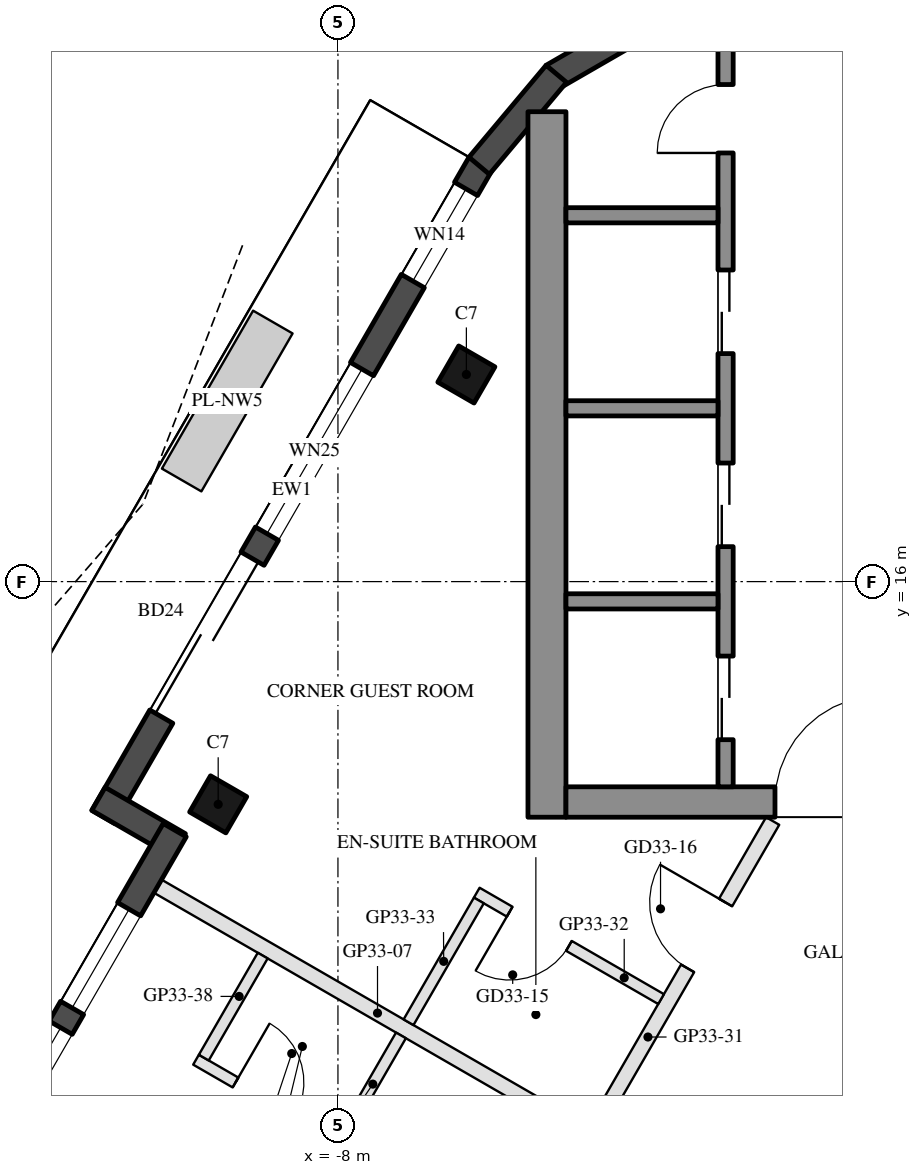
"""IFC4 building model, lengths in metres.
Left out: names, types, materials, properties, quantities, classifications, styles, units other than length and angle.
Written with IfcOpenShell. Run it as: python <this file> out.ifc"""

import sys

from ifc_helpers import new_model, si_unit, direction, frame, frame_2d, origin, origin_2d, place, context, subcontext, project, spatial, rectangle, hollow_rectangle, extrude, boolean, halfspace, element, fill, save


model = new_model("IFC4")
c1 = context("Model", 3, precision=1e-05, world=origin(), true_north=direction((0.0, 1.0)))
c2 = subcontext(c1, "Body", "Model", "MODEL_VIEW")
j1 = project(units=[si_unit("LENGTHUNIT", "METRE"), si_unit("PLANEANGLEUNIT", "RADIAN")], contexts=[c1])
p1 = place(None, origin())
s1 = spatial("IfcSite", under=j1, at=p1, CompositionType="ELEMENT")
p2 = place(p1, origin())
s2 = spatial("IfcBuilding", under=s1, at=p2, CompositionType="ELEMENT")
p3 = place(p2, frame((0.0, 0.0, 317.0)))
s3 = spatial("IfcBuildingStorey", under=s2, at=p3, CompositionType="ELEMENT", Elevation=317.0)
p4 = place(p3, frame((-6.31, 18.725, 0.0), z_axis=(0.0, 0.0, 1.0), x_axis=(0.5, 0.866025403784, 0.0)))
e1 = element("IfcColumn", 1, at=p4, inside=s3, PredefinedType="COLUMN", context=c2, shape_type="SweptSolid", body=[
    boolean("DIFFERENCE", extrude(hollow_rectangle(XDim=0.55, YDim=0.55, WallThickness=0.025, at=origin_2d()), origin(), (0.0, 0.0, 1.0), 3.7), halfspace(frame((0.0, 0.0, 3.66), z_axis=(0.0, 0.0, 1.0), x_axis=(1.0, 0.0, 0.0)), False)),
])
p5 = place(p3, frame((-9.576, 13.07, 0.0), z_axis=(0.0, 0.0, 1.0), x_axis=(0.5, 0.866025403784, 0.0)))
e2 = element("IfcColumn", 2, at=p5, inside=s3, PredefinedType="COLUMN", context=c2, shape_type="SweptSolid", body=[
    boolean("DIFFERENCE", extrude(hollow_rectangle(XDim=0.55, YDim=0.55, WallThickness=0.025, at=origin_2d()), origin(), (0.0, 0.0, 1.0), 3.7), halfspace(frame((0.0, 0.0, 3.666), z_axis=(0.0, 0.0, 1.0), x_axis=(1.0, 0.0, 0.0)), False)),
])
p6 = place(p3, frame((-6.125, 21.497, 0.0), z_axis=(0.0, 0.0, 1.0), x_axis=(-0.500002137087, -0.866024169933, 0.0)))
e3 = element("IfcWall", 3, at=p6, inside=s3, PredefinedType="SOLIDWALL", context=c2, shape_type="SweptSolid", body=[
    extrude(rectangle(XDim=9.924, YDim=0.35, at=frame_2d((4.962, 0.0))), origin(), (0.0, 0.0, 1.0), 3.55),
])
p7 = place(p6, frame((0.381, 0.0, 0.3)))
e4 = element("IfcOpeningElement", 4, at=p7, cuts=e3, PredefinedType="OPENING", context=c2, shape_type="SweptSolid", body=[
    extrude(rectangle(XDim=1.4, YDim=2.65, at=frame_2d((0.7, 1.325))), frame((0.0, 0.185, 0.0), z_axis=(0.0, -1.0, 0.0), x_axis=(1.0, 0.0, 0.0)), (0.0, 0.0, 1.0), 0.37),
])
p8 = place(p6, frame((5.999, 0.0, 0.0)))
e5 = element("IfcOpeningElement", 5, at=p8, cuts=e3, PredefinedType="OPENING", context=c2, shape_type="SweptSolid", body=[
    extrude(rectangle(XDim=2.4, YDim=2.4, at=frame_2d((1.2, 1.2))), frame((0.0, 0.185, 0.0), z_axis=(0.0, -1.0, 0.0), x_axis=(1.0, 0.0, 0.0)), (0.0, 0.0, 1.0), 0.37),
])
p9 = place(p6, frame((3.118, 0.0, 0.3)))
e6 = element("IfcOpeningElement", 6, at=p9, cuts=e3, PredefinedType="OPENING", context=c2, shape_type="SweptSolid", body=[
    extrude(rectangle(XDim=2.5, YDim=2.65, at=frame_2d((1.25, 1.325))), frame((0.0, 0.185, 0.0), z_axis=(0.0, -1.0, 0.0), x_axis=(1.0, 0.0, 0.0)), (0.0, 0.0, 1.0), 0.37),
])
p10 = place(p3, frame((-11.151, 13.142, 0.0), z_axis=(0.0, 0.0, 1.0), x_axis=(0.866005645448, -0.500034220881, 0.0)))
e7 = element("IfcWall", 7, at=p10, inside=s3, PredefinedType="SOLIDWALL", context=c2, shape_type="SweptSolid", body=[
    extrude(rectangle(XDim=1.22, YDim=0.35, at=frame_2d((0.61, 0.0))), origin(), (0.0, 0.0, 1.0), 3.55),
])
p11 = place(p3, frame((-10.147, 12.73, 0.0), z_axis=(0.0, 0.0, 1.0), x_axis=(-0.499996591357, -0.866027371756, 0.0)))
e8 = element("IfcWall", 8, at=p11, inside=s3, PredefinedType="SOLIDWALL", context=c2, shape_type="SweptSolid", body=[
    extrude(rectangle(XDim=5.371, YDim=0.35, at=frame_2d((2.685, 0.0))), origin(), (0.0, 0.0, 1.0), 3.55),
])
p12 = place(p11, frame((1.201, 0.0, 0.3)))
e9 = element("IfcOpeningElement", 9, at=p12, cuts=e8, PredefinedType="OPENING", context=c2, shape_type="SweptSolid", body=[
    extrude(rectangle(XDim=1.5, YDim=2.65, at=frame_2d((0.75, 1.325))), frame((0.0, 0.185, 0.0), z_axis=(0.0, -1.0, 0.0), x_axis=(1.0, 0.0, 0.0)), (0.0, 0.0, 1.0), 0.37),
])
p13 = place(p11, frame((3.001, 0.0, 0.3)))
e10 = element("IfcOpeningElement", 10, at=p13, cuts=e8, PredefinedType="OPENING", context=c2, shape_type="SweptSolid", body=[
    extrude(rectangle(XDim=1.5, YDim=2.65, at=frame_2d((0.75, 1.325))), frame((0.0, 0.185, 0.0), z_axis=(0.0, -1.0, 0.0), x_axis=(1.0, 0.0, 0.0)), (0.0, 0.0, 1.0), 0.37),
])
for number, where, z_axis, x_axis in (
    (11, (-3.806, 23.432, 0.0), (0.0, 0.0, 1.0), (-0.866, -0.5, 0.0)),
    (12, (-5.127, 22.681, 0.0), (0.0, 0.0, 1.0), (-0.643, -0.766, 0.0)),
):
    element("IfcWall", number, at=place(p3, frame(where, z_axis=z_axis, x_axis=x_axis)), inside=s3, PredefinedType="SOLIDWALL", context=c2, shape_type="SweptSolid", body=[
        extrude(rectangle(XDim=1.579, YDim=0.35, at=frame_2d((0.79, 0.0))), origin(), (0.0, 0.0, 1.0), 3.55),
    ])
p14 = place(p3, frame((-5.25, 12.9, 0.0), z_axis=(0.0, 0.0, 1.0), x_axis=(0.0, 1.0, 0.0)))
e13 = element("IfcWall", 13, at=p14, inside=s3, PredefinedType="SHEAR", context=c2, shape_type="SweptSolid", body=[
    extrude(rectangle(XDim=9.283, YDim=0.5, at=frame_2d((4.641, 0.0))), origin(), (0.0, 0.0, 1.0), 3.5),
])
p15 = place(p3, frame((5.0, 13.1, 0.0), z_axis=(0.0, 0.0, 1.0), x_axis=(-1.0, 0.0, 0.0)))
e14 = element("IfcWall", 14, at=p15, inside=s3, PredefinedType="SHEAR", context=c2, shape_type="SweptSolid", body=[
    extrude(rectangle(XDim=10.0, YDim=0.4, at=frame_2d((5.0, 0.0))), origin(), (0.0, 0.0, 1.0), 3.5),
])
p16 = place(p15, frame((3.55, 0.0, 0.0)))
e15 = element("IfcOpeningElement", 15, at=p16, cuts=e14, PredefinedType="OPENING", context=c2, shape_type="SweptSolid", body=[
    extrude(rectangle(XDim=1.1, YDim=2.1, at=frame_2d((0.55, 1.05))), frame((0.0, 0.21, 0.0), z_axis=(0.0, -1.0, 0.0), x_axis=(1.0, 0.0, 0.0)), (0.0, 0.0, 1.0), 0.42),
])
p17 = place(p15, frame((5.85, 0.0, 0.0)))
e16 = element("IfcOpeningElement", 16, at=p17, cuts=e14, PredefinedType="OPENING", context=c2, shape_type="SweptSolid", body=[
    extrude(rectangle(XDim=1.4, YDim=2.1, at=frame_2d((0.7, 1.05))), frame((0.0, 0.21, 0.0), z_axis=(0.0, -1.0, 0.0), x_axis=(1.0, 0.0, 0.0)), (0.0, 0.0, 1.0), 0.42),
])
p18 = place(p3, frame((-2.9, 13.3, 0.0), z_axis=(0.0, 0.0, 1.0), x_axis=(0.0, 1.0, 0.0)))
e17 = element("IfcWall", 17, at=p18, inside=s3, PredefinedType="SHEAR", context=c2, shape_type="SweptSolid", body=[
    extrude(rectangle(XDim=10.121, YDim=0.2, at=frame_2d((5.061, 0.0))), origin(), (0.0, 0.0, 1.0), 3.5),
])
p19 = place(p18, frame((0.62, 0.0, 0.0)))
e18 = element("IfcOpeningElement", 18, at=p19, cuts=e17, PredefinedType="OPENING", context=c2, shape_type="SweptSolid", body=[
    extrude(rectangle(XDim=1.1, YDim=2.1, at=frame_2d((0.55, 1.05))), frame((0.0, 0.11, 0.0), z_axis=(0.0, -1.0, 0.0), x_axis=(1.0, 0.0, 0.0)), (0.0, 0.0, 1.0), 0.22),
])
p20 = place(p18, frame((3.16, 0.0, 0.0)))
e19 = element("IfcOpeningElement", 19, at=p20, cuts=e17, PredefinedType="OPENING", context=c2, shape_type="SweptSolid", body=[
    extrude(rectangle(XDim=1.1, YDim=2.1, at=frame_2d((0.55, 1.05))), frame((0.0, 0.11, 0.0), z_axis=(0.0, -1.0, 0.0), x_axis=(1.0, 0.0, 0.0)), (0.0, 0.0, 1.0), 0.22),
])
p21 = place(p18, frame((5.7, 0.0, 0.0)))
e20 = element("IfcOpeningElement", 20, at=p21, cuts=e17, PredefinedType="OPENING", context=c2, shape_type="SweptSolid", body=[
    extrude(rectangle(XDim=1.1, YDim=2.1, at=frame_2d((0.55, 1.05))), frame((0.0, 0.11, 0.0), z_axis=(0.0, -1.0, 0.0), x_axis=(1.0, 0.0, 0.0)), (0.0, 0.0, 1.0), 0.22),
])
p22 = place(p18, frame((8.34, 0.0, 0.0)))
e21 = element("IfcOpeningElement", 21, at=p22, cuts=e17, PredefinedType="OPENING", context=c2, shape_type="SweptSolid", body=[
    extrude(rectangle(XDim=0.9, YDim=2.1, at=frame_2d((0.45, 1.05))), frame((0.0, 0.11, 0.0), z_axis=(0.0, -1.0, 0.0), x_axis=(1.0, 0.0, 0.0)), (0.0, 0.0, 1.0), 0.22),
])
for number, where, z_axis, x_axis in (
    (22, (-3.0, 15.74, 0.0), (0.0, 0.0, 1.0), (-1.0, 0.0, 0.0)),
    (23, (-3.0, 18.28, 0.0), (0.0, 0.0, 1.0), (-1.0, 0.0, 0.0)),
    (24, (-3.0, 20.82, 0.0), (0.0, 0.0, 1.0), (-1.0, 0.0, 0.0)),
):
    element("IfcWall", number, at=place(p3, frame(where, z_axis=z_axis, x_axis=x_axis)), inside=s3, PredefinedType="SHEAR", context=c2, shape_type="SweptSolid", body=[
        extrude(rectangle(XDim=2.0, YDim=0.2, at=frame_2d((1.0, 0.0))), origin(), (0.0, 0.0, 1.0), 3.5),
    ])
p23 = place(p3, frame((-10.371, 11.992, 0.0), z_axis=(0.0, 0.0, 1.0), x_axis=(0.866020588255, -0.50000834065, 0.0)))
e25 = element("IfcWall", 25, at=p23, inside=s3, PredefinedType="PARTITIONING", context=c2, shape_type="SweptSolid", body=[
    extrude(rectangle(XDim=6.678, YDim=0.2, at=frame_2d((3.339, 0.0))), origin(), (0.0, 0.0, 1.0), 3.1),
])
p24 = place(p3, frame((-4.625, 8.79, 0.0), z_axis=(0.0, 0.0, 1.0), x_axis=(0.499964368059, 0.866045974918, 0.0)))
e26 = element("IfcWall", 26, at=p24, inside=s3, PredefinedType="PARTITIONING", context=c2, shape_type="SweptSolid", body=[
    extrude(rectangle(XDim=4.688, YDim=0.2, at=frame_2d((2.344, 0.0))), origin(), (0.0, 0.0, 1.0), 3.1),
])
p25 = place(p24, frame((2.45, 0.0, 0.0)))
e27 = element("IfcOpeningElement", 27, at=p25, cuts=e26, PredefinedType="OPENING", context=c2, shape_type="SweptSolid", body=[
    extrude(rectangle(XDim=1.0, YDim=2.1, at=frame_2d((0.5, 1.05))), frame((0.0, 0.11, 0.0), z_axis=(0.0, -1.0, 0.0), x_axis=(1.0, 0.0, 0.0)), (0.0, 0.0, 1.0), 0.22),
])
p26 = place(p3, frame((-3.749, 10.507, 0.0), z_axis=(0.0, 0.0, 1.0), x_axis=(-0.866034573852, 0.49998411664, 0.0)))
e28 = element("IfcWall", 28, at=p26, inside=s3, PredefinedType="PARTITIONING", context=c2, shape_type="SweptSolid", body=[
    extrude(rectangle(XDim=2.8, YDim=0.15, at=frame_2d((1.4, 0.0))), origin(), (0.0, 0.0, 1.0), 3.55),
])
p27 = place(p26, frame((1.4, 0.0, 0.0)))
e29 = element("IfcOpeningElement", 29, at=p27, cuts=e28, PredefinedType="OPENING", context=c2, shape_type="SweptSolid", body=[
    extrude(rectangle(XDim=0.9, YDim=2.1, at=frame_2d((0.45, 1.05))), frame((0.0, 0.085, 0.0), z_axis=(0.0, -1.0, 0.0), x_axis=(1.0, 0.0, 0.0)), (0.0, 0.0, 1.0), 0.17),
])
for number, where, z_axis, x_axis in (
    (30, (-6.146, 11.805, 0.0), (0.0, 0.0, 1.0), (-0.5, -0.866, 0.0)),
    (31, (-7.171, 10.029, 0.0), (0.0, 0.0, 1.0), (-0.5, -0.866, 0.0)),
):
    element("IfcWall", number, at=place(p3, frame(where, z_axis=z_axis, x_axis=x_axis)), inside=s3, PredefinedType="PARTITIONING", context=c2, shape_type="SweptSolid", body=[
        extrude(rectangle(XDim=1.85, YDim=0.15, at=frame_2d((0.925, 0.0))), origin(), (0.0, 0.0, 1.0), 3.1),
    ])
p28 = place(p3, frame((-9.867, 9.709, 0.0), z_axis=(0.0, 0.0, 1.0), x_axis=(0.866009402589, -0.500027713859, 0.0)))
e32 = element("IfcWall", 32, at=p28, inside=s3, PredefinedType="PARTITIONING", context=c2, shape_type="SweptSolid", body=[
    extrude(rectangle(XDim=2.1, YDim=0.15, at=frame_2d((1.05, 0.0))), origin(), (0.0, 0.0, 1.0), 3.55),
])
p29 = place(p28, frame((0.6, 0.0, 0.0)))
e33 = element("IfcOpeningElement", 33, at=p29, cuts=e32, PredefinedType="OPENING", context=c2, shape_type="SweptSolid", body=[
    extrude(rectangle(XDim=0.9, YDim=2.1, at=frame_2d((0.45, 1.05))), frame((0.0, 0.085, 0.0), z_axis=(0.0, -1.0, 0.0), x_axis=(1.0, 0.0, 0.0)), (0.0, 0.0, 1.0), 0.17),
])
p30 = place(p3, frame((-8.99, 11.079, 0.0), z_axis=(0.0, 0.0, 1.0), x_axis=(-0.500086022567, -0.865975732936, 0.0)))
e34 = element("IfcWall", 34, at=p30, inside=s3, PredefinedType="PARTITIONING", context=c2, shape_type="SweptSolid", body=[
    extrude(rectangle(XDim=1.55, YDim=0.15, at=frame_2d((0.775, 0.0))), origin(), (0.0, 0.0, 1.0), 3.55),
])
p31 = place(p7, origin())
e35 = element("IfcWindow", 35, at=p31, inside=s3, PartitioningType="SINGLE_PANEL", PredefinedType="WINDOW", context=c2, shape_type="SweptSolid", body=[
    extrude(rectangle(XDim=1.4, YDim=2.65, at=frame_2d((0.7, 1.325))), frame((0.0, 0.03, 0.0), z_axis=(0.0, -1.0, 0.0), x_axis=(1.0, 0.0, 0.0)), (0.0, 0.0, 1.0), 0.06),
])
fill(e4, e35)
p32 = place(p8, frame((2.4, 0.0, 0.0), z_axis=(0.0, 0.0, 1.0), x_axis=(-1.0, 0.0, 0.0)))
e36 = element("IfcDoor", 36, at=p32, inside=s3, OperationType="SLIDING_TO_LEFT", PredefinedType="DOOR", context=c2, shape_type="SweptSolid", body=[
    extrude(rectangle(XDim=2.4, YDim=2.4, at=frame_2d((1.2, 1.2))), frame((0.0, 0.025, 0.0), z_axis=(0.0, -1.0, 0.0), x_axis=(1.0, 0.0, 0.0)), (0.0, 0.0, 1.0), 0.05),
])
fill(e5, e36)
p33 = place(p9, origin())
e37 = element("IfcWindow", 37, at=p33, inside=s3, PartitioningType="SINGLE_PANEL", PredefinedType="WINDOW", context=c2, shape_type="SweptSolid", body=[
    extrude(rectangle(XDim=2.5, YDim=2.65, at=frame_2d((1.25, 1.325))), frame((0.0, 0.03, 0.0), z_axis=(0.0, -1.0, 0.0), x_axis=(1.0, 0.0, 0.0)), (0.0, 0.0, 1.0), 0.06),
])
fill(e6, e37)
p34 = place(p12, origin())
e38 = element("IfcWindow", 38, at=p34, inside=s3, PartitioningType="SINGLE_PANEL", PredefinedType="WINDOW", context=c2, shape_type="SweptSolid", body=[
    extrude(rectangle(XDim=1.5, YDim=2.65, at=frame_2d((0.75, 1.325))), frame((0.0, 0.03, 0.0), z_axis=(0.0, -1.0, 0.0), x_axis=(1.0, 0.0, 0.0)), (0.0, 0.0, 1.0), 0.06),
])
fill(e9, e38)
p35 = place(p13, origin())
e39 = element("IfcWindow", 39, at=p35, inside=s3, PartitioningType="SINGLE_PANEL", PredefinedType="WINDOW", context=c2, shape_type="SweptSolid", body=[
    extrude(rectangle(XDim=1.5, YDim=2.65, at=frame_2d((0.75, 1.325))), frame((0.0, 0.03, 0.0), z_axis=(0.0, -1.0, 0.0), x_axis=(1.0, 0.0, 0.0)), (0.0, 0.0, 1.0), 0.06),
])
fill(e10, e39)
p36 = place(p19, origin())
e40 = element("IfcDoor", 40, at=p36, inside=s3, OperationType="DOUBLE_DOOR_SLIDING", PredefinedType="DOOR", context=c2, shape_type="SweptSolid", body=[
    extrude(rectangle(XDim=1.1, YDim=2.1, at=frame_2d((0.55, 1.05))), frame((0.0, 0.025, 0.0), z_axis=(0.0, -1.0, 0.0), x_axis=(1.0, 0.0, 0.0)), (0.0, 0.0, 1.0), 0.05),
])
fill(e18, e40)
p37 = place(p20, origin())
e41 = element("IfcDoor", 41, at=p37, inside=s3, OperationType="DOUBLE_DOOR_SLIDING", PredefinedType="DOOR", context=c2, shape_type="SweptSolid", body=[
    extrude(rectangle(XDim=1.1, YDim=2.1, at=frame_2d((0.55, 1.05))), frame((0.0, 0.025, 0.0), z_axis=(0.0, -1.0, 0.0), x_axis=(1.0, 0.0, 0.0)), (0.0, 0.0, 1.0), 0.05),
])
fill(e19, e41)
p38 = place(p21, origin())
e42 = element("IfcDoor", 42, at=p38, inside=s3, OperationType="DOUBLE_DOOR_SLIDING", PredefinedType="DOOR", context=c2, shape_type="SweptSolid", body=[
    extrude(rectangle(XDim=1.1, YDim=2.1, at=frame_2d((0.55, 1.05))), frame((0.0, 0.025, 0.0), z_axis=(0.0, -1.0, 0.0), x_axis=(1.0, 0.0, 0.0)), (0.0, 0.0, 1.0), 0.05),
])
fill(e20, e42)
p39 = place(p22, origin())
e43 = element("IfcDoor", 43, at=p39, inside=s3, OperationType="SINGLE_SWING_LEFT", PredefinedType="DOOR", context=c2, shape_type="SweptSolid", body=[
    extrude(rectangle(XDim=0.9, YDim=2.1, at=frame_2d((0.45, 1.05))), frame((0.0, 0.025, 0.0), z_axis=(0.0, -1.0, 0.0), x_axis=(1.0, 0.0, 0.0)), (0.0, 0.0, 1.0), 0.05),
])
fill(e21, e43)
p40 = place(p17, frame((1.4, 0.0, 0.0), z_axis=(0.0, 0.0, 1.0), x_axis=(-1.0, 0.0, 0.0)))
e44 = element("IfcDoor", 44, at=p40, inside=s3, OperationType="DOUBLE_DOOR_SINGLE_SWING", PredefinedType="DOOR", context=c2, shape_type="SweptSolid", body=[
    extrude(rectangle(XDim=1.4, YDim=2.1, at=frame_2d((0.7, 1.05))), frame((0.0, 0.025, 0.0), z_axis=(0.0, -1.0, 0.0), x_axis=(1.0, 0.0, 0.0)), (0.0, 0.0, 1.0), 0.05),
])
fill(e16, e44)
p41 = place(p27, origin())
e45 = element("IfcDoor", 45, at=p41, inside=s3, OperationType="SINGLE_SWING_RIGHT", PredefinedType="DOOR", context=c2, shape_type="SweptSolid", body=[
    extrude(rectangle(XDim=0.9, YDim=2.1, at=frame_2d((0.45, 1.05))), frame((0.0, 0.025, 0.0), z_axis=(0.0, -1.0, 0.0), x_axis=(1.0, 0.0, 0.0)), (0.0, 0.0, 1.0), 0.05),
])
fill(e29, e45)
p42 = place(p25, origin())
e46 = element("IfcDoor", 46, at=p42, inside=s3, OperationType="SINGLE_SWING_RIGHT", PredefinedType="DOOR", context=c2, shape_type="SweptSolid", body=[
    extrude(rectangle(XDim=1.0, YDim=2.1, at=frame_2d((0.5, 1.05))), frame((0.0, 0.025, 0.0), z_axis=(0.0, -1.0, 0.0), x_axis=(1.0, 0.0, 0.0)), (0.0, 0.0, 1.0), 0.05),
])
fill(e27, e46)
p43 = place(p29, origin())
e47 = element("IfcDoor", 47, at=p43, inside=s3, OperationType="SINGLE_SWING_LEFT", PredefinedType="DOOR", context=c2, shape_type="SweptSolid", body=[
    extrude(rectangle(XDim=0.9, YDim=2.1, at=frame_2d((0.45, 1.05))), frame((0.0, 0.025, 0.0), z_axis=(0.0, -1.0, 0.0), x_axis=(1.0, 0.0, 0.0)), (0.0, 0.0, 1.0), 0.05),
])
fill(e33, e47)
save(model, sys.argv[1])
